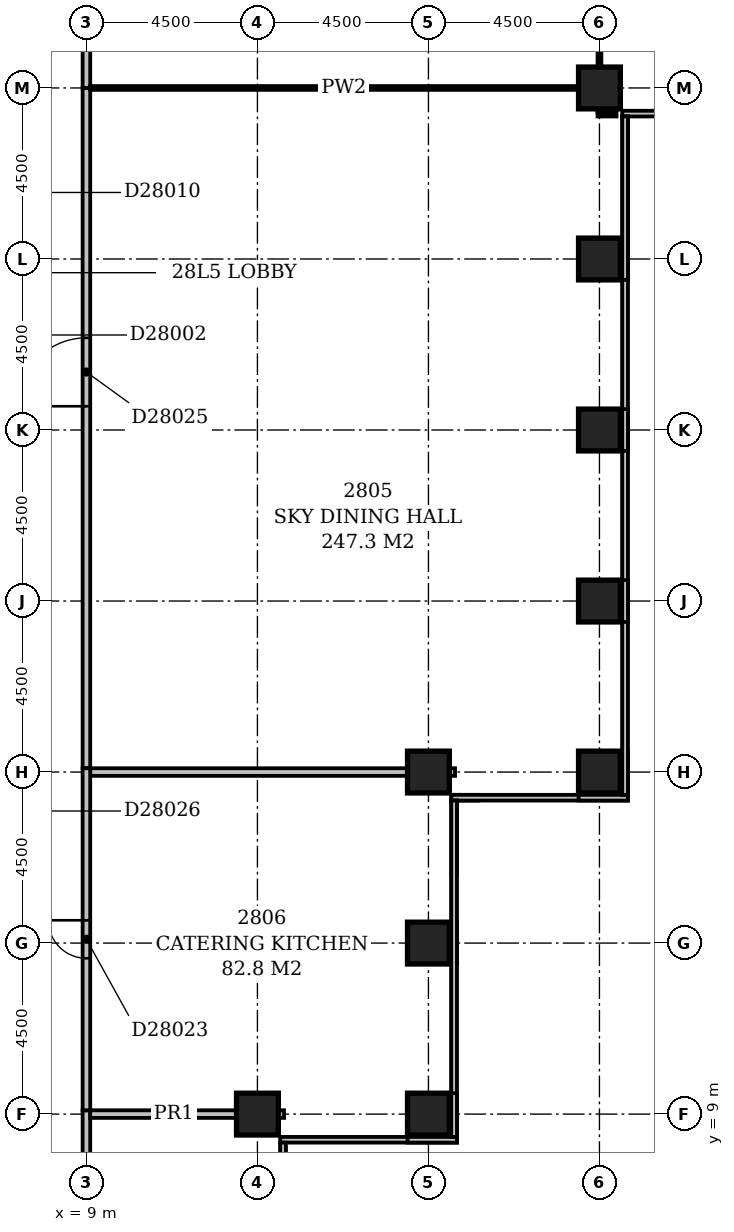
"""IFC4 building model, lengths in metres.
Left out: names, types, materials, properties, quantities, classifications, styles, units other than length and angle.
Written with IfcOpenShell. Run it as: python <this file> out.ifc"""

import sys

from ifc_helpers import new_model, si_unit, direction, frame, frame_2d, origin, origin_2d, place, context, subcontext, project, spatial, rectangle, extrude, element, fill, save


model = new_model("IFC4")
c1 = context("Model", 3, precision=1e-05, world=origin(), true_north=direction((0.0, 1.0)))
c2 = subcontext(c1, "Body", "Model", "MODEL_VIEW")
j1 = project(units=[si_unit("LENGTHUNIT", "METRE"), si_unit("PLANEANGLEUNIT", "RADIAN")], contexts=[c1])
p1 = place(None, origin())
s1 = spatial("IfcSite", under=j1, at=p1, CompositionType="ELEMENT")
p2 = place(p1, origin())
s2 = spatial("IfcBuilding", under=s1, at=p2, CompositionType="ELEMENT")
p3 = place(p2, frame((0.0, 0.0, 113.6)))
s3 = spatial("IfcBuildingStorey", under=s2, at=p3, CompositionType="ELEMENT", Elevation=113.6)
for number, where, z_axis, x_axis in (
    (1, (13.5, 9.0, -0.5), (0.0, 0.0, 1.0), (1.0, 0.0, 0.0)),
    (2, (18.0, 9.0, -0.5), (0.0, 0.0, 1.0), (1.0, 0.0, 0.0)),
    (3, (18.0, 13.5, -0.5), (0.0, 0.0, 1.0), (1.0, 0.0, 0.0)),
    (4, (18.0, 18.0, -0.5), (0.0, 0.0, 1.0), (1.0, 0.0, 0.0)),
    (5, (22.5, 18.0, -0.5), (0.0, 0.0, 1.0), (1.0, 0.0, 0.0)),
    (6, (22.5, 22.5, -0.5), (0.0, 0.0, 1.0), (1.0, 0.0, 0.0)),
    (7, (22.5, 27.0, -0.5), (0.0, 0.0, 1.0), (1.0, 0.0, 0.0)),
    (8, (22.5, 31.5, -0.5), (0.0, 0.0, 1.0), (1.0, 0.0, 0.0)),
    (9, (22.5, 36.0, -0.5), (0.0, 0.0, 1.0), (1.0, 0.0, 0.0)),
):
    element("IfcColumn", number, at=place(p3, frame(where, z_axis=z_axis, x_axis=x_axis)), inside=s3, PredefinedType="COLUMN", context=c2, shape_type="SweptSolid", body=[
        extrude(rectangle(XDim=1.1, YDim=1.1, at=origin_2d()), origin(), (0.0, 0.0, 1.0), 6.2),
    ])
p4 = place(p3, frame((14.175, 3.9, 0.0), z_axis=(0.0, 0.0, 1.0), x_axis=(0.0, 1.0, 0.0)))
e10 = element("IfcWall", 10, at=p4, inside=s3, PredefinedType="STANDARD", context=c2, shape_type="SweptSolid", body=[
    extrude(rectangle(XDim=4.35, YDim=0.15, at=frame_2d((2.175, 0.0))), origin(), (0.0, 0.0, 1.0), 1.1),
])
p5 = place(p3, frame((14.1, 8.325, 0.0), z_axis=(0.0, 0.0, 1.0), x_axis=(1.0, 0.0, 0.0)))
e11 = element("IfcWall", 11, at=p5, inside=s3, PredefinedType="STANDARD", context=c2, shape_type="SweptSolid", body=[
    extrude(rectangle(XDim=4.65, YDim=0.15, at=frame_2d((2.325, 0.0))), origin(), (0.0, 0.0, 1.0), 1.1),
])
p6 = place(p3, frame((18.675, 8.4, 0.0), z_axis=(0.0, 0.0, 1.0), x_axis=(0.0, 1.0, 0.0)))
e12 = element("IfcWall", 12, at=p6, inside=s3, PredefinedType="STANDARD", context=c2, shape_type="SweptSolid", body=[
    extrude(rectangle(XDim=8.85, YDim=0.15, at=frame_2d((4.425, 0.0))), origin(), (0.0, 0.0, 1.0), 1.1),
])
p7 = place(p3, frame((18.6, 17.325, 0.0), z_axis=(0.0, 0.0, 1.0), x_axis=(1.0, 0.0, 0.0)))
e13 = element("IfcWall", 13, at=p7, inside=s3, PredefinedType="STANDARD", context=c2, shape_type="SweptSolid", body=[
    extrude(rectangle(XDim=4.65, YDim=0.15, at=frame_2d((2.325, 0.0))), origin(), (0.0, 0.0, 1.0), 1.1),
])
p8 = place(p3, frame((23.175, 17.4, 0.0), z_axis=(0.0, 0.0, 1.0), x_axis=(0.0, 1.0, 0.0)))
e14 = element("IfcWall", 14, at=p8, inside=s3, PredefinedType="STANDARD", context=c2, shape_type="SweptSolid", body=[
    extrude(rectangle(XDim=17.85, YDim=0.15, at=frame_2d((8.925, 0.0))), origin(), (0.0, 0.0, 1.0), 1.1),
])
p9 = place(p3, frame((23.1, 35.325, 0.0), z_axis=(0.0, 0.0, 1.0), x_axis=(1.0, 0.0, 0.0)))
e15 = element("IfcWall", 15, at=p9, inside=s3, PredefinedType="STANDARD", context=c2, shape_type="SweptSolid", body=[
    extrude(rectangle(XDim=45.15, YDim=0.15, at=frame_2d((22.575, 0.0))), origin(), (0.0, 0.0, 1.0), 1.1),
])
p10 = place(p3, frame((17.45, 8.325, 1.1), z_axis=(0.0, 0.0, 1.0), x_axis=(1.0, 0.0, 0.0)))
e16 = element("IfcWall", 16, at=p10, inside=s3, PredefinedType="STANDARD", context=c2, shape_type="SweptSolid", body=[
    extrude(rectangle(XDim=1.3, YDim=0.15, at=frame_2d((0.65, 0.0))), origin(), (0.0, 0.0, 1.0), 4.0),
])
p11 = place(p3, frame((18.675, 8.4, 1.1), z_axis=(0.0, 0.0, 1.0), x_axis=(0.0, 1.0, 0.0)))
e17 = element("IfcWall", 17, at=p11, inside=s3, PredefinedType="STANDARD", context=c2, shape_type="SweptSolid", body=[
    extrude(rectangle(XDim=1.15, YDim=0.15, at=frame_2d((0.575, 0.0))), origin(), (0.0, 0.0, 1.0), 4.0),
])
p12 = place(p3, frame((18.675, 12.95, 1.1), z_axis=(0.0, 0.0, 1.0), x_axis=(0.0, 1.0, 0.0)))
e18 = element("IfcWall", 18, at=p12, inside=s3, PredefinedType="STANDARD", context=c2, shape_type="SweptSolid", body=[
    extrude(rectangle(XDim=1.1, YDim=0.15, at=frame_2d((0.55, 0.0))), origin(), (0.0, 0.0, 1.0), 4.0),
])
p13 = place(p3, frame((18.675, 15.328, 1.1), z_axis=(0.0, 0.0, 1.0), x_axis=(0.0, 1.0, 0.0)))
e19 = element("IfcWall", 19, at=p13, inside=s3, PredefinedType="STANDARD", context=c2, shape_type="SweptSolid", body=[
    extrude(rectangle(XDim=1.922, YDim=0.15, at=frame_2d((0.961, 0.0))), origin(), (0.0, 0.0, 1.0), 4.0),
])
p14 = place(p3, frame((18.6, 17.325, 1.1), z_axis=(0.0, 0.0, 1.0), x_axis=(1.0, 0.0, 0.0)))
e20 = element("IfcWall", 20, at=p14, inside=s3, PredefinedType="STANDARD", context=c2, shape_type="SweptSolid", body=[
    extrude(rectangle(XDim=0.713, YDim=0.15, at=frame_2d((0.356, 0.0))), origin(), (0.0, 0.0, 1.0), 4.0),
])
p15 = place(p3, frame((21.95, 17.325, 1.1), z_axis=(0.0, 0.0, 1.0), x_axis=(1.0, 0.0, 0.0)))
e21 = element("IfcWall", 21, at=p15, inside=s3, PredefinedType="STANDARD", context=c2, shape_type="SweptSolid", body=[
    extrude(rectangle(XDim=1.3, YDim=0.15, at=frame_2d((0.65, 0.0))), origin(), (0.0, 0.0, 1.0), 4.0),
])
p16 = place(p3, frame((23.175, 17.4, 1.1), z_axis=(0.0, 0.0, 1.0), x_axis=(0.0, 1.0, 0.0)))
e22 = element("IfcWall", 22, at=p16, inside=s3, PredefinedType="STANDARD", context=c2, shape_type="SweptSolid", body=[
    extrude(rectangle(XDim=1.15, YDim=0.15, at=frame_2d((0.575, 0.0))), origin(), (0.0, 0.0, 1.0), 4.0),
])
for number, where, z_axis, x_axis in (
    (23, (23.175, 21.95, 1.1), (0.0, 0.0, 1.0), (0.0, 1.0, 0.0)),
    (24, (23.175, 26.45, 1.1), (0.0, 0.0, 1.0), (0.0, 1.0, 0.0)),
):
    element("IfcWall", number, at=place(p3, frame(where, z_axis=z_axis, x_axis=x_axis)), inside=s3, PredefinedType="STANDARD", context=c2, shape_type="SweptSolid", body=[
        extrude(rectangle(XDim=1.1, YDim=0.15, at=frame_2d((0.55, 0.0))), origin(), (0.0, 0.0, 1.0), 4.0),
    ])
p17 = place(p3, frame((23.175, 30.95, 1.1), z_axis=(0.0, 0.0, 1.0), x_axis=(0.0, 1.0, 0.0)))
e25 = element("IfcWall", 25, at=p17, inside=s3, PredefinedType="STANDARD", context=c2, shape_type="SweptSolid", body=[
    extrude(rectangle(XDim=4.3, YDim=0.15, at=frame_2d((2.15, 0.0))), origin(), (0.0, 0.0, 1.0), 4.0),
])
p18 = place(p3, frame((9.0, 5.1, 0.0), z_axis=(0.0, 0.0, 1.0), x_axis=(0.0, 1.0, 0.0)))
e26 = element("IfcWall", 26, at=p18, inside=s3, PredefinedType="PARTITIONING", context=c2, shape_type="SweptSolid", body=[
    extrude(rectangle(XDim=4.0, YDim=0.2, at=frame_2d((2.0, 0.0))), origin(), (0.0, 0.0, 1.0), 5.7),
])
p19 = place(p18, frame((1.55, 0.0, 0.0)))
e27 = element("IfcOpeningElement", 27, at=p19, cuts=e26, PredefinedType="OPENING", context=c2, shape_type="SweptSolid", body=[
    extrude(rectangle(XDim=0.9, YDim=2.1, at=frame_2d((0.45, 1.05))), frame((0.0, 0.112, 0.0), z_axis=(0.0, -1.0, 0.0), x_axis=(1.0, 0.0, 0.0)), (0.0, 0.0, 1.0), 0.224),
])
p20 = place(p3, frame((9.0, 9.1, 0.0), z_axis=(0.0, 0.0, 1.0), x_axis=(0.0, 1.0, 0.0)))
e28 = element("IfcWall", 28, at=p20, inside=s3, PredefinedType="PARTITIONING", context=c2, shape_type="SweptSolid", body=[
    extrude(rectangle(XDim=9.0, YDim=0.2, at=frame_2d((4.5, 0.0))), origin(), (0.0, 0.0, 1.0), 5.7),
])
p21 = place(p20, frame((4.0, 0.0, 0.0)))
e29 = element("IfcOpeningElement", 29, at=p21, cuts=e28, PredefinedType="OPENING", context=c2, shape_type="SweptSolid", body=[
    extrude(rectangle(XDim=1.0, YDim=2.1, at=frame_2d((0.5, 1.05))), frame((0.0, 0.112, 0.0), z_axis=(0.0, -1.0, 0.0), x_axis=(1.0, 0.0, 0.0)), (0.0, 0.0, 1.0), 0.224),
])
p22 = place(p3, frame((13.5, 9.0, 0.0), z_axis=(0.0, 0.0, 1.0), x_axis=(-1.0, 0.0, 0.0)))
e30 = element("IfcWall", 30, at=p22, inside=s3, PredefinedType="PARTITIONING", context=c2, shape_type="SweptSolid", body=[
    extrude(rectangle(XDim=4.4, YDim=0.2, at=frame_2d((2.2, 0.0))), origin(), (0.0, 0.0, 1.0), 5.7),
])
p23 = place(p3, frame((14.2, 9.0, 0.0), z_axis=(0.0, 0.0, 1.0), x_axis=(-1.0, 0.0, 0.0)))
e31 = element("IfcWall", 31, at=p23, inside=s3, PredefinedType="PARTITIONING", context=c2, shape_type="SweptSolid", body=[
    extrude(rectangle(XDim=0.7, YDim=0.2, at=frame_2d((0.35, 0.0))), origin(), (0.0, 0.0, 1.0), 5.1),
])
p24 = place(p3, frame((9.0, 18.1, 0.0), z_axis=(0.0, 0.0, 1.0), x_axis=(0.0, 1.0, 0.0)))
e32 = element("IfcWall", 32, at=p24, inside=s3, PredefinedType="PARTITIONING", context=c2, shape_type="SweptSolid", body=[
    extrude(rectangle(XDim=17.9, YDim=0.2, at=frame_2d((8.95, 0.0))), origin(), (0.0, 0.0, 1.0), 5.7),
])
p25 = place(p24, frame((9.525, 0.0, 0.0)))
e33 = element("IfcOpeningElement", 33, at=p25, cuts=e32, PredefinedType="OPENING", context=c2, shape_type="SweptSolid", body=[
    extrude(rectangle(XDim=1.8, YDim=2.4, at=frame_2d((0.9, 1.2))), frame((0.0, 0.112, 0.0), z_axis=(0.0, -1.0, 0.0), x_axis=(1.0, 0.0, 0.0)), (0.0, 0.0, 1.0), 0.224),
])
p26 = place(p3, frame((18.0, 18.0, 0.0), z_axis=(0.0, 0.0, 1.0), x_axis=(-1.0, 0.0, 0.0)))
e34 = element("IfcWall", 34, at=p26, inside=s3, PredefinedType="PARTITIONING", context=c2, shape_type="SweptSolid", body=[
    extrude(rectangle(XDim=8.9, YDim=0.2, at=frame_2d((4.45, 0.0))), origin(), (0.0, 0.0, 1.0), 5.0),
])
p27 = place(p3, frame((18.7, 18.0, 0.0), z_axis=(0.0, 0.0, 1.0), x_axis=(-1.0, 0.0, 0.0)))
e35 = element("IfcWall", 35, at=p27, inside=s3, PredefinedType="PARTITIONING", context=c2, shape_type="SweptSolid", body=[
    extrude(rectangle(XDim=0.7, YDim=0.2, at=frame_2d((0.35, 0.0))), origin(), (0.0, 0.0, 1.0), 5.1),
])
p28 = place(p3, frame((22.5, 35.35, 0.0), z_axis=(0.0, 0.0, 1.0), x_axis=(0.0, 1.0, 0.0)))
e36 = element("IfcWall", 36, at=p28, inside=s3, PredefinedType="PARTITIONING", context=c2, shape_type="SweptSolid", body=[
    extrude(rectangle(XDim=0.6, YDim=0.1, at=frame_2d((0.3, 0.0))), origin(), (0.0, 0.0, 1.0), 5.1),
])
p29 = place(p3, frame((22.95, 35.3, 0.0), z_axis=(0.0, 0.0, 1.0), x_axis=(-1.0, 0.0, 0.0)))
e37 = element("IfcWall", 37, at=p29, inside=s3, PredefinedType="PARTITIONING", context=c2, shape_type="SweptSolid", body=[
    extrude(rectangle(XDim=0.5, YDim=0.1, at=frame_2d((0.25, 0.0))), origin(), (0.0, 0.0, 1.0), 5.7),
])
p30 = place(p3, frame((9.0, 36.0, 0.0), z_axis=(0.0, 0.0, 1.0), x_axis=(0.0, 1.0, 0.0)))
e38 = element("IfcWall", 38, at=p30, inside=s3, PredefinedType="PARTITIONING", context=c2, shape_type="SweptSolid", body=[
    extrude(rectangle(XDim=13.4, YDim=0.2, at=frame_2d((6.7, 0.0))), origin(), (0.0, 0.0, 1.0), 5.7),
])
p31 = place(p3, frame((22.45, 36.0, 0.0), z_axis=(0.0, 0.0, 1.0), x_axis=(-1.0, 0.0, 0.0)))
e39 = element("IfcWall", 39, at=p31, inside=s3, PredefinedType="PARTITIONING", context=c2, shape_type="SweptSolid", body=[
    extrude(rectangle(XDim=13.35, YDim=0.1, at=frame_2d((6.675, 0.0))), origin(), (0.0, 0.0, 1.0), 5.7),
])
p32 = place(p3, frame((22.5, 49.4, 0.0), z_axis=(0.0, 0.0, 1.0), x_axis=(0.0, -1.0, 0.0)))
e40 = element("IfcWall", 40, at=p32, inside=s3, PredefinedType="PARTITIONING", context=c2, shape_type="SweptSolid", body=[
    extrude(rectangle(XDim=13.45, YDim=0.1, at=frame_2d((6.725, 0.0))), origin(), (0.0, 0.0, 1.0), 5.7),
])
p33 = place(p21, frame((1.0, 0.0, 0.0), z_axis=(0.0, 0.0, 1.0), x_axis=(-1.0, 0.0, 0.0)))
e41 = element("IfcDoor", 41, at=p33, inside=s3, OperationType="SINGLE_SWING_LEFT", PredefinedType="DOOR", context=c2, shape_type="SweptSolid", body=[
    extrude(rectangle(XDim=1.0, YDim=2.1, at=frame_2d((0.5, 1.05))), frame((0.0, 0.025, 0.0), z_axis=(0.0, -1.0, 0.0), x_axis=(1.0, 0.0, 0.0)), (0.0, 0.0, 1.0), 0.05),
])
fill(e29, e41)
p34 = place(p25, origin())
e42 = element("IfcDoor", 42, at=p34, inside=s3, OperationType="DOUBLE_DOOR_SINGLE_SWING", PredefinedType="DOOR", context=c2, shape_type="SweptSolid", body=[
    extrude(rectangle(XDim=1.8, YDim=2.4, at=frame_2d((0.9, 1.2))), frame((0.0, 0.025, 0.0), z_axis=(0.0, -1.0, 0.0), x_axis=(1.0, 0.0, 0.0)), (0.0, 0.0, 1.0), 0.05),
])
fill(e33, e42)
save(model, sys.argv[1])
